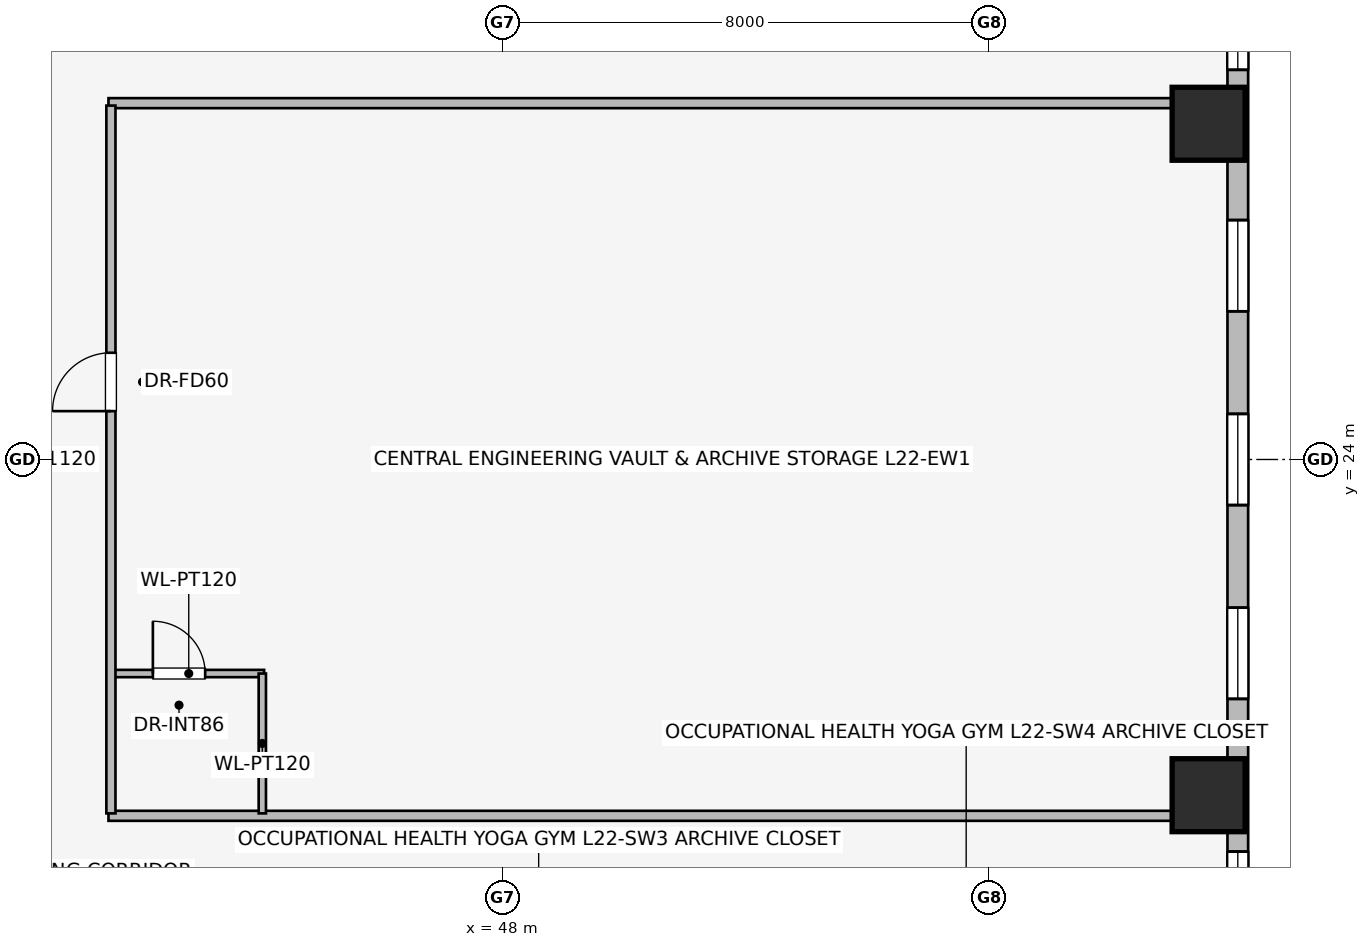
"""IFC4 building model, lengths in metres.
Left out: names, types, materials, properties, quantities, classifications, styles, units other than length and angle.
Written with IfcOpenShell. Run it as: python <this file> out.ifc"""

import sys

from ifc_helpers import new_model, si_unit, direction, frame, frame_2d, origin, origin_2d, place, context, subcontext, project, spatial, rectangle, extrude, element, fill, save


model = new_model("IFC4")
c1 = context("Model", 3, precision=1e-05, world=origin(), true_north=direction((0.0, 1.0)))
c2 = subcontext(c1, "Body", "Model", "MODEL_VIEW")
j1 = project(units=[si_unit("LENGTHUNIT", "METRE"), si_unit("PLANEANGLEUNIT", "RADIAN")], contexts=[c1])
p1 = place(None, origin())
s1 = spatial("IfcSite", under=j1, at=p1, CompositionType="ELEMENT")
p2 = place(p1, origin())
s2 = spatial("IfcBuilding", under=s1, at=p2, CompositionType="ELEMENT")
p3 = place(p2, frame((0.0, 0.0, 85.4)))
s3 = spatial("IfcBuildingStorey", under=s2, at=p3, CompositionType="ELEMENT", Elevation=85.4)
for number, where, z_axis, x_axis in (
    (1, (59.613, 18.479, 0.0), (0.0, 0.0, 1.0), (1.0, 0.0, 0.0)),
    (2, (59.613, 29.521, 0.0), (0.0, 0.0, 1.0), (1.0, 0.0, 0.0)),
):
    element("IfcColumn", number, at=place(p3, frame(where, z_axis=z_axis, x_axis=x_axis)), inside=s3, PredefinedType="COLUMN", context=c2, shape_type="SweptSolid", body=[
        extrude(rectangle(XDim=1.2, YDim=1.2, at=origin_2d()), origin(), (0.0, 0.0, 1.0), 3.65),
    ])
p4 = place(p3, frame((60.093, 33.202, 0.0), z_axis=(0.0, 0.0, 1.0), x_axis=(0.0, -1.0, 0.0)))
e3 = element("IfcWall", 3, at=p4, inside=s3, PredefinedType="STANDARD", context=c2, shape_type="SweptSolid", body=[
    extrude(rectangle(XDim=18.404, YDim=0.34, at=frame_2d((9.202, 0.0))), origin(), (0.0, 0.0, 1.0), 2.684),
])
p5 = place(p4, frame((1.744, 0.0, 0.75)))
e4 = element("IfcOpeningElement", 4, at=p5, cuts=e3, PredefinedType="OPENING", context=c2, shape_type="SweptSolid", body=[
    extrude(rectangle(XDim=1.05, YDim=1.4, at=frame_2d((0.525, 0.7))), frame((0.0, 0.18, 0.0), z_axis=(0.0, -1.0, 0.0), x_axis=(1.0, 0.0, 0.0)), (0.0, 0.0, 1.0), 0.36),
])
p6 = place(p4, frame((5.265, 0.0, 0.75)))
e5 = element("IfcOpeningElement", 5, at=p6, cuts=e3, PredefinedType="OPENING", context=c2, shape_type="SweptSolid", body=[
    extrude(rectangle(XDim=1.5, YDim=1.5, at=frame_2d((0.75, 0.75))), frame((0.0, 0.18, 0.0), z_axis=(0.0, -1.0, 0.0), x_axis=(1.0, 0.0, 0.0)), (0.0, 0.0, 1.0), 0.36),
])
p7 = place(p4, frame((8.452, 0.0, 0.75)))
e6 = element("IfcOpeningElement", 6, at=p7, cuts=e3, PredefinedType="OPENING", context=c2, shape_type="SweptSolid", body=[
    extrude(rectangle(XDim=1.5, YDim=1.5, at=frame_2d((0.75, 0.75))), frame((0.0, 0.18, 0.0), z_axis=(0.0, -1.0, 0.0), x_axis=(1.0, 0.0, 0.0)), (0.0, 0.0, 1.0), 0.36),
])
p8 = place(p4, frame((11.639, 0.0, 0.75)))
e7 = element("IfcOpeningElement", 7, at=p8, cuts=e3, PredefinedType="OPENING", context=c2, shape_type="SweptSolid", body=[
    extrude(rectangle(XDim=1.5, YDim=1.5, at=frame_2d((0.75, 0.75))), frame((0.0, 0.18, 0.0), z_axis=(0.0, -1.0, 0.0), x_axis=(1.0, 0.0, 0.0)), (0.0, 0.0, 1.0), 0.36),
])
p9 = place(p4, frame((15.65, 0.0, 0.75)))
e8 = element("IfcOpeningElement", 8, at=p9, cuts=e3, PredefinedType="OPENING", context=c2, shape_type="SweptSolid", body=[
    extrude(rectangle(XDim=1.05, YDim=1.4, at=frame_2d((0.525, 0.7))), frame((0.0, 0.18, 0.0), z_axis=(0.0, -1.0, 0.0), x_axis=(1.0, 0.0, 0.0)), (0.0, 0.0, 1.0), 0.36),
])
for number, where, z_axis, x_axis in (
    (9, (41.52, 18.14, 0.0), (0.0, 0.0, 1.0), (1.0, 0.0, 0.0)),
    (10, (41.52, 29.86, 0.0), (0.0, 0.0, 1.0), (1.0, 0.0, 0.0)),
):
    element("IfcWall", number, at=place(p3, frame(where, z_axis=z_axis, x_axis=x_axis)), inside=s3, PredefinedType="PARTITIONING", context=c2, shape_type="SweptSolid", body=[
        extrude(rectangle(XDim=18.453, YDim=0.165, at=frame_2d((9.227, 0.0))), origin(), (0.0, 0.0, 1.0), 3.39),
    ])
p10 = place(p3, frame((41.6, 20.48, 0.0), z_axis=(0.0, 0.0, 1.0), x_axis=(1.0, 0.0, 0.0)))
e11 = element("IfcWall", 11, at=p10, inside=s3, PredefinedType="PARTITIONING", context=c2, shape_type="SweptSolid", body=[
    extrude(rectangle(XDim=2.48, YDim=0.12, at=frame_2d((1.24, 0.0))), origin(), (0.0, 0.0, 1.0), 3.39),
])
p11 = place(p10, frame((0.65, 0.0, 0.0)))
e12 = element("IfcOpeningElement", 12, at=p11, cuts=e11, PredefinedType="OPENING", context=c2, shape_type="SweptSolid", body=[
    extrude(rectangle(XDim=0.86, YDim=2.0, at=frame_2d((0.43, 1.0))), frame((0.0, 0.07, 0.0), z_axis=(0.0, -1.0, 0.0), x_axis=(1.0, 0.0, 0.0)), (0.0, 0.0, 1.0), 0.14),
])
p12 = place(p3, frame((44.05, 18.18, 0.0), z_axis=(0.0, 0.0, 1.0), x_axis=(0.0, 1.0, 0.0)))
e13 = element("IfcWall", 13, at=p12, inside=s3, PredefinedType="PARTITIONING", context=c2, shape_type="SweptSolid", body=[
    extrude(rectangle(XDim=2.3, YDim=0.12, at=frame_2d((1.15, 0.0))), origin(), (0.0, 0.0, 1.0), 3.39),
])
p13 = place(p3, frame((41.56, 18.18, 0.0), z_axis=(0.0, 0.0, 1.0), x_axis=(0.0, 1.0, 0.0)))
e14 = element("IfcWall", 14, at=p13, inside=s3, PredefinedType="PARTITIONING", context=c2, shape_type="SweptSolid", body=[
    extrude(rectangle(XDim=11.64, YDim=0.15, at=frame_2d((5.82, 0.0))), origin(), (0.0, 0.0, 1.0), 3.39),
])
p14 = place(p13, frame((6.615, 0.0, 0.0)))
e15 = element("IfcOpeningElement", 15, at=p14, cuts=e14, PredefinedType="OPENING", context=c2, shape_type="SweptSolid", body=[
    extrude(rectangle(XDim=0.96, YDim=2.0, at=frame_2d((0.48, 1.0))), frame((0.0, 0.085, 0.0), z_axis=(0.0, -1.0, 0.0), x_axis=(1.0, 0.0, 0.0)), (0.0, 0.0, 1.0), 0.17),
])
p15 = place(p5, origin())
e16 = element("IfcWindow", 16, at=p15, inside=s3, PartitioningType="SINGLE_PANEL", PredefinedType="WINDOW", context=c2, shape_type="SweptSolid", body=[
    extrude(rectangle(XDim=1.05, YDim=1.4, at=frame_2d((0.525, 0.7))), frame((0.0, 0.03, 0.0), z_axis=(0.0, -1.0, 0.0), x_axis=(1.0, 0.0, 0.0)), (0.0, 0.0, 1.0), 0.06),
])
fill(e4, e16)
p16 = place(p6, origin())
e17 = element("IfcWindow", 17, at=p16, inside=s3, PartitioningType="SINGLE_PANEL", PredefinedType="WINDOW", context=c2, shape_type="SweptSolid", body=[
    extrude(rectangle(XDim=1.5, YDim=1.5, at=frame_2d((0.75, 0.75))), frame((0.0, 0.03, 0.0), z_axis=(0.0, -1.0, 0.0), x_axis=(1.0, 0.0, 0.0)), (0.0, 0.0, 1.0), 0.06),
])
fill(e5, e17)
p17 = place(p7, origin())
e18 = element("IfcWindow", 18, at=p17, inside=s3, PartitioningType="SINGLE_PANEL", PredefinedType="WINDOW", context=c2, shape_type="SweptSolid", body=[
    extrude(rectangle(XDim=1.5, YDim=1.5, at=frame_2d((0.75, 0.75))), frame((0.0, 0.03, 0.0), z_axis=(0.0, -1.0, 0.0), x_axis=(1.0, 0.0, 0.0)), (0.0, 0.0, 1.0), 0.06),
])
fill(e6, e18)
p18 = place(p8, origin())
e19 = element("IfcWindow", 19, at=p18, inside=s3, PartitioningType="SINGLE_PANEL", PredefinedType="WINDOW", context=c2, shape_type="SweptSolid", body=[
    extrude(rectangle(XDim=1.5, YDim=1.5, at=frame_2d((0.75, 0.75))), frame((0.0, 0.03, 0.0), z_axis=(0.0, -1.0, 0.0), x_axis=(1.0, 0.0, 0.0)), (0.0, 0.0, 1.0), 0.06),
])
fill(e7, e19)
p19 = place(p9, origin())
e20 = element("IfcWindow", 20, at=p19, inside=s3, PartitioningType="SINGLE_PANEL", PredefinedType="WINDOW", context=c2, shape_type="SweptSolid", body=[
    extrude(rectangle(XDim=1.05, YDim=1.4, at=frame_2d((0.525, 0.7))), frame((0.0, 0.03, 0.0), z_axis=(0.0, -1.0, 0.0), x_axis=(1.0, 0.0, 0.0)), (0.0, 0.0, 1.0), 0.06),
])
fill(e8, e20)
p20 = place(p11, origin())
e21 = element("IfcDoor", 21, at=p20, inside=s3, OperationType="SINGLE_SWING_LEFT", PredefinedType="DOOR", context=c2, shape_type="SweptSolid", body=[
    extrude(rectangle(XDim=0.86, YDim=2.0, at=frame_2d((0.43, 1.0))), frame((0.0, 0.025, 0.0), z_axis=(0.0, -1.0, 0.0), x_axis=(1.0, 0.0, 0.0)), (0.0, 0.0, 1.0), 0.05),
])
fill(e12, e21)
p21 = place(p14, origin())
e22 = element("IfcDoor", 22, at=p21, inside=s3, OperationType="SINGLE_SWING_LEFT", PredefinedType="DOOR", context=c2, shape_type="SweptSolid", body=[
    extrude(rectangle(XDim=0.96, YDim=2.0, at=frame_2d((0.48, 1.0))), frame((0.0, 0.025, 0.0), z_axis=(0.0, -1.0, 0.0), x_axis=(1.0, 0.0, 0.0)), (0.0, 0.0, 1.0), 0.05),
])
fill(e15, e22)
save(model, sys.argv[1])
